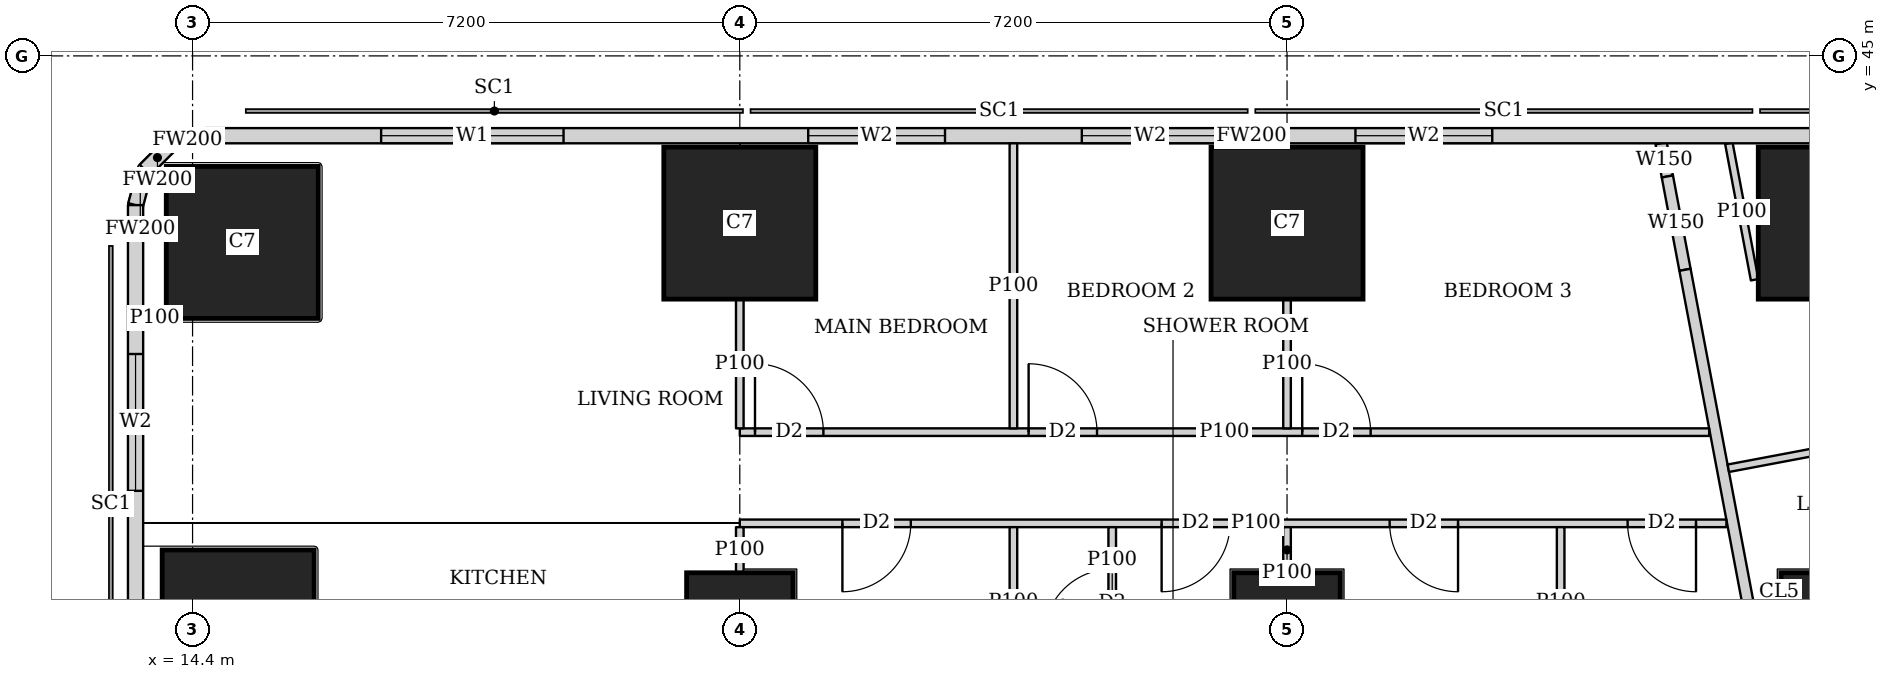
"""IFC4 building model, lengths in metres.
Left out: names, types, materials, properties, quantities, classifications, styles, units other than length and angle.
Written with IfcOpenShell. Run it as: python <this file> out.ifc"""

import sys

from ifc_helpers import new_model, si_unit, direction, frame, frame_2d, origin, origin_2d, place, context, subcontext, project, spatial, rectangle, extrude, element, fill, save


model = new_model("IFC4")
c1 = context("Model", 3, precision=1e-05, world=origin(), true_north=direction((0.0, 1.0)))
c2 = subcontext(c1, "Body", "Model", "MODEL_VIEW")
j1 = project(units=[si_unit("LENGTHUNIT", "METRE"), si_unit("PLANEANGLEUNIT", "RADIAN")], contexts=[c1])
p1 = place(None, origin())
s1 = spatial("IfcSite", under=j1, at=p1, CompositionType="ELEMENT")
p2 = place(p1, origin())
s2 = spatial("IfcBuilding", under=s1, at=p2, CompositionType="ELEMENT")
p3 = place(p2, frame((0.0, 0.0, 270.35)))
s3 = spatial("IfcBuildingStorey", under=s2, at=p3, CompositionType="ELEMENT", Elevation=270.35)
p4 = place(p3, frame((15.0, 37.5, 0.0), z_axis=(0.0, 0.0, 1.0), x_axis=(1.0, 0.0, 0.0)))
e1 = element("IfcColumn", 1, at=p4, inside=s3, PredefinedType="COLUMN", context=c2, shape_type="SweptSolid", body=[
    extrude(rectangle(XDim=2.0, YDim=2.0, at=origin_2d()), origin(), (0.0, 0.0, 1.0), 3.75),
])
for number, where, z_axis, x_axis in (
    (2, (21.6, 37.5, 0.0), (0.0, 0.0, 1.0), (1.0, 0.0, 0.0)),
    (3, (28.8, 37.5, 0.0), (0.0, 0.0, 1.0), (1.0, 0.0, 0.0)),
    (4, (36.0, 37.5, 0.0), (0.0, 0.0, 1.0), (1.0, 0.0, 0.0)),
):
    element("IfcColumn", number, at=place(p3, frame(where, z_axis=z_axis, x_axis=x_axis)), inside=s3, PredefinedType="COLUMN", context=c2, shape_type="SweptSolid", body=[
        extrude(rectangle(XDim=1.4, YDim=1.4, at=origin_2d()), origin(), (0.0, 0.0, 1.0), 3.75),
    ])
for number, where, z_axis, x_axis in (
    (5, (15.054, 42.546, 0.0), (0.0, 0.0, 1.0), (1.0, 0.0, 0.0)),
    (6, (21.6, 42.8, 0.0), (0.0, 0.0, 1.0), (1.0, 0.0, 0.0)),
    (7, (28.8, 42.8, 0.0), (0.0, 0.0, 1.0), (1.0, 0.0, 0.0)),
    (8, (36.0, 42.8, 0.0), (0.0, 0.0, 1.0), (1.0, 0.0, 0.0)),
):
    element("IfcColumn", number, at=place(p3, frame(where, z_axis=z_axis, x_axis=x_axis)), inside=s3, PredefinedType="COLUMN", context=c2, shape_type="SweptSolid", body=[
        extrude(rectangle(XDim=2.0, YDim=2.0, at=origin_2d()), origin(), (0.0, 0.0, 1.0), 3.75),
    ])
p5 = place(p3, frame((42.103, 43.95, 0.0), z_axis=(0.0, 0.0, 1.0), x_axis=(-1.0, 0.0, 0.0)))
e9 = element("IfcWall", 9, at=p5, inside=s3, PredefinedType="SOLIDWALL", context=c2, shape_type="SweptSolid", body=[
    extrude(rectangle(XDim=27.54, YDim=0.2, at=frame_2d((13.77, 0.0))), origin(), (0.0, 0.0, 1.0), 3.5),
])
p6 = place(p5, frame((10.603, 0.0, 0.9)))
e10 = element("IfcOpeningElement", 10, at=p6, cuts=e9, PredefinedType="OPENING", context=c2, shape_type="SweptSolid", body=[
    extrude(rectangle(XDim=1.8, YDim=1.5, at=frame_2d((0.9, 0.75))), frame((0.0, 0.11, 0.0), z_axis=(0.0, -1.0, 0.0), x_axis=(1.0, 0.0, 0.0)), (0.0, 0.0, 1.0), 0.22),
])
p7 = place(p5, frame((14.203, 0.0, 0.9)))
e11 = element("IfcOpeningElement", 11, at=p7, cuts=e9, PredefinedType="OPENING", context=c2, shape_type="SweptSolid", body=[
    extrude(rectangle(XDim=1.8, YDim=1.5, at=frame_2d((0.9, 0.75))), frame((0.0, 0.11, 0.0), z_axis=(0.0, -1.0, 0.0), x_axis=(1.0, 0.0, 0.0)), (0.0, 0.0, 1.0), 0.22),
])
p8 = place(p5, frame((17.803, 0.0, 0.9)))
e12 = element("IfcOpeningElement", 12, at=p8, cuts=e9, PredefinedType="OPENING", context=c2, shape_type="SweptSolid", body=[
    extrude(rectangle(XDim=1.8, YDim=1.5, at=frame_2d((0.9, 0.75))), frame((0.0, 0.11, 0.0), z_axis=(0.0, -1.0, 0.0), x_axis=(1.0, 0.0, 0.0)), (0.0, 0.0, 1.0), 0.22),
])
p9 = place(p5, frame((22.822, 0.0, 0.9)))
e13 = element("IfcOpeningElement", 13, at=p9, cuts=e9, PredefinedType="OPENING", context=c2, shape_type="SweptSolid", body=[
    extrude(rectangle(XDim=2.4, YDim=1.5, at=frame_2d((1.2, 0.75))), frame((0.0, 0.11, 0.0), z_axis=(0.0, -1.0, 0.0), x_axis=(1.0, 0.0, 0.0)), (0.0, 0.0, 1.0), 0.22),
])
p10 = place(p3, frame((14.563, 43.95, 0.0), z_axis=(0.0, 0.0, 1.0), x_axis=(-0.965655254015, -0.259826731483, 0.0)))
e14 = element("IfcWall", 14, at=p10, inside=s3, PredefinedType="SOLIDWALL", context=c2, shape_type="SweptSolid", body=[
    extrude(rectangle(XDim=0.477, YDim=0.2, at=frame_2d((0.239, 0.0))), origin(), (0.0, 0.0, 1.0), 3.5),
])
p11 = place(p3, frame((14.102, 43.826, 0.0), z_axis=(0.0, 0.0, 1.0), x_axis=(-0.707369890659, -0.706843573776, 0.0)))
e15 = element("IfcWall", 15, at=p11, inside=s3, PredefinedType="SOLIDWALL", context=c2, shape_type="SweptSolid", body=[
    extrude(rectangle(XDim=0.464, YDim=0.2, at=frame_2d((0.232, 0.0))), origin(), (0.0, 0.0, 1.0), 3.5),
])
p12 = place(p3, frame((13.774, 43.498, 0.0), z_axis=(0.0, 0.0, 1.0), x_axis=(-0.259826731483, -0.965655254015, 0.0)))
e16 = element("IfcWall", 16, at=p12, inside=s3, PredefinedType="SOLIDWALL", context=c2, shape_type="SweptSolid", body=[
    extrude(rectangle(XDim=0.477, YDim=0.2, at=frame_2d((0.239, 0.0))), origin(), (0.0, 0.0, 1.0), 3.5),
])
p13 = place(p3, frame((13.65, 43.037, 0.0), z_axis=(0.0, 0.0, 1.0), x_axis=(0.0, -1.0, 0.0)))
e17 = element("IfcWall", 17, at=p13, inside=s3, PredefinedType="SOLIDWALL", context=c2, shape_type="SweptSolid", body=[
    extrude(rectangle(XDim=35.374, YDim=0.2, at=frame_2d((17.687, 0.0))), origin(), (0.0, 0.0, 1.0), 3.5),
])
p14 = place(p13, frame((1.959, 0.0, 0.9)))
e18 = element("IfcOpeningElement", 18, at=p14, cuts=e17, PredefinedType="OPENING", context=c2, shape_type="SweptSolid", body=[
    extrude(rectangle(XDim=1.8, YDim=1.5, at=frame_2d((0.9, 0.75))), frame((0.0, 0.11, 0.0), z_axis=(0.0, -1.0, 0.0), x_axis=(1.0, 0.0, 0.0)), (0.0, 0.0, 1.0), 0.22),
])
p15 = place(p3, frame((33.722, 43.85, 0.0), z_axis=(0.0, 0.0, 1.0), x_axis=(0.184886516626, -0.982759877066, 0.0)))
e19 = element("IfcWall", 19, at=p15, inside=s3, PredefinedType="SOLIDWALL", context=c2, shape_type="SweptSolid", body=[
    extrude(rectangle(XDim=0.444, YDim=0.15, at=frame_2d((0.222, 0.0))), origin(), (0.0, 0.0, 1.0), 3.5),
])
p16 = place(p3, frame((33.804, 43.414, 0.0), z_axis=(0.0, 0.0, 1.0), x_axis=(0.185585816539, -0.982628060204, 0.0)))
e20 = element("IfcWall", 20, at=p16, inside=s3, PredefinedType="SOLIDWALL", context=c2, shape_type="SweptSolid", body=[
    extrude(rectangle(XDim=1.25, YDim=0.15, at=frame_2d((0.625, 0.0))), origin(), (0.0, 0.0, 1.0), 2.05),
])
p17 = place(p3, frame((34.036, 42.186, 0.0), z_axis=(0.0, 0.0, 1.0), x_axis=(0.185593518645, -0.9826266055, 0.0)))
e21 = element("IfcWall", 21, at=p17, inside=s3, PredefinedType="SOLIDWALL", context=c2, shape_type="SweptSolid", body=[
    extrude(rectangle(XDim=35.961, YDim=0.15, at=frame_2d((17.98, 0.0))), origin(), (0.0, 0.0, 1.0), 2.5),
])
p18 = place(p17, frame((15.529, 0.0, 0.0)))
e22 = element("IfcOpeningElement", 22, at=p18, cuts=e21, PredefinedType="OPENING", context=c2, shape_type="SweptSolid", body=[
    extrude(rectangle(XDim=1.0, YDim=2.1, at=frame_2d((0.5, 1.05))), frame((0.0, 0.085, 0.0), z_axis=(0.0, -1.0, 0.0), x_axis=(1.0, 0.0, 0.0)), (0.0, 0.0, 1.0), 0.17),
])
p19 = place(p17, frame((19.345, 0.0, 0.0)))
e23 = element("IfcOpeningElement", 23, at=p19, cuts=e21, PredefinedType="OPENING", context=c2, shape_type="SweptSolid", body=[
    extrude(rectangle(XDim=1.0, YDim=2.1, at=frame_2d((0.5, 1.05))), frame((0.0, 0.085, 0.0), z_axis=(0.0, -1.0, 0.0), x_axis=(1.0, 0.0, 0.0)), (0.0, 0.0, 1.0), 0.17),
])
p20 = place(p17, frame((30.594, 0.0, 0.0)))
e24 = element("IfcOpeningElement", 24, at=p20, cuts=e21, PredefinedType="OPENING", context=c2, shape_type="SweptSolid", body=[
    extrude(rectangle(XDim=1.0, YDim=2.1, at=frame_2d((0.5, 1.05))), frame((0.0, 0.085, 0.0), z_axis=(0.0, -1.0, 0.0), x_axis=(1.0, 0.0, 0.0)), (0.0, 0.0, 1.0), 0.17),
])
p21 = place(p3, frame((34.952, 42.055, 0.0), z_axis=(0.0, 0.0, 1.0), x_axis=(-0.185490642006, 0.98264603074, 0.0)))
e25 = element("IfcWall", 25, at=p21, inside=s3, PredefinedType="PARTITIONING", context=c2, shape_type="SweptSolid", body=[
    extrude(rectangle(XDim=1.827, YDim=0.1, at=frame_2d((0.914, 0.0))), origin(), (0.0, 0.0, 1.0), 2.05),
])
p22 = place(p3, frame((37.824, 40.182, 0.0), z_axis=(0.0, 0.0, 1.0), x_axis=(-0.982674977865, -0.185337227447, 0.0)))
e26 = element("IfcWall", 26, at=p22, inside=s3, PredefinedType="PARTITIONING", context=c2, shape_type="SweptSolid", body=[
    extrude(rectangle(XDim=3.275, YDim=0.1, at=frame_2d((1.637, 0.0))), origin(), (0.0, 0.0, 1.0), 3.5),
])
p23 = place(p3, frame((14.054, 41.546, 0.0), z_axis=(0.0, 0.0, 1.0), x_axis=(-1.0, 0.0, 0.0)))
e27 = element("IfcWall", 27, at=p23, inside=s3, PredefinedType="PARTITIONING", context=c2, shape_type="SweptSolid", body=[
    extrude(rectangle(XDim=0.304, YDim=0.1, at=frame_2d((0.152, 0.0))), origin(), (0.0, 0.0, 1.0), 3.5),
])
p24 = place(p3, frame((21.6, 40.05, 0.0), z_axis=(0.0, 0.0, 1.0), x_axis=(1.0, 0.0, 0.0)))
e28 = element("IfcWall", 28, at=p24, inside=s3, PredefinedType="PARTITIONING", context=c2, shape_type="SweptSolid", body=[
    extrude(rectangle(XDim=12.754, YDim=0.1, at=frame_2d((6.377, 0.0))), origin(), (0.0, 0.0, 1.0), 3.5),
])
p25 = place(p24, frame((0.2, 0.0, 0.0)))
e29 = element("IfcOpeningElement", 29, at=p25, cuts=e28, PredefinedType="OPENING", context=c2, shape_type="SweptSolid", body=[
    extrude(rectangle(XDim=0.9, YDim=2.1, at=frame_2d((0.45, 1.05))), frame((0.0, 0.06, 0.0), z_axis=(0.0, -1.0, 0.0), x_axis=(1.0, 0.0, 0.0)), (0.0, 0.0, 1.0), 0.12),
])
p26 = place(p24, frame((3.8, 0.0, 0.0)))
e30 = element("IfcOpeningElement", 30, at=p26, cuts=e28, PredefinedType="OPENING", context=c2, shape_type="SweptSolid", body=[
    extrude(rectangle(XDim=0.9, YDim=2.1, at=frame_2d((0.45, 1.05))), frame((0.0, 0.06, 0.0), z_axis=(0.0, -1.0, 0.0), x_axis=(1.0, 0.0, 0.0)), (0.0, 0.0, 1.0), 0.12),
])
p27 = place(p24, frame((7.4, 0.0, 0.0)))
e31 = element("IfcOpeningElement", 31, at=p27, cuts=e28, PredefinedType="OPENING", context=c2, shape_type="SweptSolid", body=[
    extrude(rectangle(XDim=0.9, YDim=2.1, at=frame_2d((0.45, 1.05))), frame((0.0, 0.06, 0.0), z_axis=(0.0, -1.0, 0.0), x_axis=(1.0, 0.0, 0.0)), (0.0, 0.0, 1.0), 0.12),
])
p28 = place(p3, frame((21.6, 38.85, 0.0), z_axis=(0.0, 0.0, 1.0), x_axis=(1.0, 0.0, 0.0)))
e32 = element("IfcWall", 32, at=p28, inside=s3, PredefinedType="PARTITIONING", context=c2, shape_type="SweptSolid", body=[
    extrude(rectangle(XDim=12.981, YDim=0.1, at=frame_2d((6.49, 0.0))), origin(), (0.0, 0.0, 1.0), 3.5),
])
p29 = place(p28, frame((1.35, 0.0, 0.0)))
e33 = element("IfcOpeningElement", 33, at=p29, cuts=e32, PredefinedType="OPENING", context=c2, shape_type="SweptSolid", body=[
    extrude(rectangle(XDim=0.9, YDim=2.1, at=frame_2d((0.45, 1.05))), frame((0.0, 0.06, 0.0), z_axis=(0.0, -1.0, 0.0), x_axis=(1.0, 0.0, 0.0)), (0.0, 0.0, 1.0), 0.12),
])
p30 = place(p28, frame((5.55, 0.0, 0.0)))
e34 = element("IfcOpeningElement", 34, at=p30, cuts=e32, PredefinedType="OPENING", context=c2, shape_type="SweptSolid", body=[
    extrude(rectangle(XDim=0.9, YDim=2.1, at=frame_2d((0.45, 1.05))), frame((0.0, 0.06, 0.0), z_axis=(0.0, -1.0, 0.0), x_axis=(1.0, 0.0, 0.0)), (0.0, 0.0, 1.0), 0.12),
])
p31 = place(p28, frame((8.55, 0.0, 0.0)))
e35 = element("IfcOpeningElement", 35, at=p31, cuts=e32, PredefinedType="OPENING", context=c2, shape_type="SweptSolid", body=[
    extrude(rectangle(XDim=0.9, YDim=2.1, at=frame_2d((0.45, 1.05))), frame((0.0, 0.06, 0.0), z_axis=(0.0, -1.0, 0.0), x_axis=(1.0, 0.0, 0.0)), (0.0, 0.0, 1.0), 0.12),
])
p32 = place(p28, frame((11.681, 0.0, 0.0)))
e36 = element("IfcOpeningElement", 36, at=p32, cuts=e32, PredefinedType="OPENING", context=c2, shape_type="SweptSolid", body=[
    extrude(rectangle(XDim=0.9, YDim=2.1, at=frame_2d((0.45, 1.05))), frame((0.0, 0.06, 0.0), z_axis=(0.0, -1.0, 0.0), x_axis=(1.0, 0.0, 0.0)), (0.0, 0.0, 1.0), 0.12),
])
p33 = place(p3, frame((21.6, 40.1, 0.0), z_axis=(0.0, 0.0, 1.0), x_axis=(0.0, 1.0, 0.0)))
e37 = element("IfcWall", 37, at=p33, inside=s3, PredefinedType="PARTITIONING", context=c2, shape_type="SweptSolid", body=[
    extrude(rectangle(XDim=1.699, YDim=0.1, at=frame_2d((0.85, 0.0))), origin(), (0.0, 0.0, 1.0), 3.5),
])
p34 = place(p3, frame((25.2, 40.1, 0.0), z_axis=(0.0, 0.0, 1.0), x_axis=(0.0, 1.0, 0.0)))
e38 = element("IfcWall", 38, at=p34, inside=s3, PredefinedType="PARTITIONING", context=c2, shape_type="SweptSolid", body=[
    extrude(rectangle(XDim=3.75, YDim=0.1, at=frame_2d((1.875, 0.0))), origin(), (0.0, 0.0, 1.0), 2.05),
])
p35 = place(p3, frame((28.8, 40.1, 0.0), z_axis=(0.0, 0.0, 1.0), x_axis=(0.0, 1.0, 0.0)))
e39 = element("IfcWall", 39, at=p35, inside=s3, PredefinedType="PARTITIONING", context=c2, shape_type="SweptSolid", body=[
    extrude(rectangle(XDim=1.699, YDim=0.1, at=frame_2d((0.85, 0.0))), origin(), (0.0, 0.0, 1.0), 3.5),
])
p36 = place(p3, frame((21.6, 38.201, 0.0), z_axis=(0.0, 0.0, 1.0), x_axis=(0.0, 1.0, 0.0)))
e40 = element("IfcWall", 40, at=p36, inside=s3, PredefinedType="PARTITIONING", context=c2, shape_type="SweptSolid", body=[
    extrude(rectangle(XDim=0.599, YDim=0.1, at=frame_2d((0.3, 0.0))), origin(), (0.0, 0.0, 1.0), 3.5),
])
p37 = place(p3, frame((25.2, 36.825, 0.0), z_axis=(0.0, 0.0, 1.0), x_axis=(0.0, 1.0, 0.0)))
e41 = element("IfcWall", 41, at=p37, inside=s3, PredefinedType="PARTITIONING", context=c2, shape_type="SweptSolid", body=[
    extrude(rectangle(XDim=1.975, YDim=0.1, at=frame_2d((0.988, 0.0))), origin(), (0.0, 0.0, 1.0), 3.5),
])
p38 = place(p3, frame((28.8, 38.201, 0.0), z_axis=(0.0, 0.0, 1.0), x_axis=(0.0, 1.0, 0.0)))
e42 = element("IfcWall", 42, at=p38, inside=s3, PredefinedType="PARTITIONING", context=c2, shape_type="SweptSolid", body=[
    extrude(rectangle(XDim=0.599, YDim=0.1, at=frame_2d((0.3, 0.0))), origin(), (0.0, 0.0, 1.0), 3.5),
])
p39 = place(p3, frame((32.4, 36.825, 0.0), z_axis=(0.0, 0.0, 1.0), x_axis=(0.0, 1.0, 0.0)))
e43 = element("IfcWall", 43, at=p39, inside=s3, PredefinedType="PARTITIONING", context=c2, shape_type="SweptSolid", body=[
    extrude(rectangle(XDim=1.975, YDim=0.1, at=frame_2d((0.988, 0.0))), origin(), (0.0, 0.0, 1.0), 3.5),
])
p40 = place(p3, frame((26.5, 36.825, 0.0), z_axis=(0.0, 0.0, 1.0), x_axis=(0.0, 1.0, 0.0)))
e44 = element("IfcWall", 44, at=p40, inside=s3, PredefinedType="PARTITIONING", context=c2, shape_type="SweptSolid", body=[
    extrude(rectangle(XDim=1.975, YDim=0.1, at=frame_2d((0.988, 0.0))), origin(), (0.0, 0.0, 1.0), 3.5),
])
p41 = place(p40, frame((0.525, 0.0, 0.0)))
e45 = element("IfcOpeningElement", 45, at=p41, cuts=e44, PredefinedType="OPENING", context=c2, shape_type="SweptSolid", body=[
    extrude(rectangle(XDim=0.9, YDim=2.1, at=frame_2d((0.45, 1.05))), frame((0.0, 0.06, 0.0), z_axis=(0.0, -1.0, 0.0), x_axis=(1.0, 0.0, 0.0)), (0.0, 0.0, 1.0), 0.12),
])
p42 = place(p6, origin())
e46 = element("IfcWindow", 46, at=p42, inside=s3, PartitioningType="SINGLE_PANEL", PredefinedType="WINDOW", context=c2, shape_type="SweptSolid", body=[
    extrude(rectangle(XDim=1.8, YDim=1.5, at=frame_2d((0.9, 0.75))), frame((0.0, 0.03, 0.0), z_axis=(0.0, -1.0, 0.0), x_axis=(1.0, 0.0, 0.0)), (0.0, 0.0, 1.0), 0.06),
])
fill(e10, e46)
p43 = place(p7, origin())
e47 = element("IfcWindow", 47, at=p43, inside=s3, PartitioningType="SINGLE_PANEL", PredefinedType="WINDOW", context=c2, shape_type="SweptSolid", body=[
    extrude(rectangle(XDim=1.8, YDim=1.5, at=frame_2d((0.9, 0.75))), frame((0.0, 0.03, 0.0), z_axis=(0.0, -1.0, 0.0), x_axis=(1.0, 0.0, 0.0)), (0.0, 0.0, 1.0), 0.06),
])
fill(e11, e47)
p44 = place(p8, origin())
e48 = element("IfcWindow", 48, at=p44, inside=s3, PartitioningType="SINGLE_PANEL", PredefinedType="WINDOW", context=c2, shape_type="SweptSolid", body=[
    extrude(rectangle(XDim=1.8, YDim=1.5, at=frame_2d((0.9, 0.75))), frame((0.0, 0.03, 0.0), z_axis=(0.0, -1.0, 0.0), x_axis=(1.0, 0.0, 0.0)), (0.0, 0.0, 1.0), 0.06),
])
fill(e12, e48)
p45 = place(p9, origin())
e49 = element("IfcWindow", 49, at=p45, inside=s3, PartitioningType="SINGLE_PANEL", PredefinedType="WINDOW", context=c2, shape_type="SweptSolid", body=[
    extrude(rectangle(XDim=2.4, YDim=1.5, at=frame_2d((1.2, 0.75))), frame((0.0, 0.03, 0.0), z_axis=(0.0, -1.0, 0.0), x_axis=(1.0, 0.0, 0.0)), (0.0, 0.0, 1.0), 0.06),
])
fill(e13, e49)
p46 = place(p14, origin())
e50 = element("IfcWindow", 50, at=p46, inside=s3, PartitioningType="SINGLE_PANEL", PredefinedType="WINDOW", context=c2, shape_type="SweptSolid", body=[
    extrude(rectangle(XDim=1.8, YDim=1.5, at=frame_2d((0.9, 0.75))), frame((0.0, 0.03, 0.0), z_axis=(0.0, -1.0, 0.0), x_axis=(1.0, 0.0, 0.0)), (0.0, 0.0, 1.0), 0.06),
])
fill(e18, e50)
p47 = place(p25, origin())
e51 = element("IfcDoor", 51, at=p47, inside=s3, OperationType="SINGLE_SWING_LEFT", PredefinedType="DOOR", context=c2, shape_type="SweptSolid", body=[
    extrude(rectangle(XDim=0.9, YDim=2.1, at=frame_2d((0.45, 1.05))), frame((0.0, 0.025, 0.0), z_axis=(0.0, -1.0, 0.0), x_axis=(1.0, 0.0, 0.0)), (0.0, 0.0, 1.0), 0.05),
])
fill(e29, e51)
p48 = place(p26, origin())
e52 = element("IfcDoor", 52, at=p48, inside=s3, OperationType="SINGLE_SWING_LEFT", PredefinedType="DOOR", context=c2, shape_type="SweptSolid", body=[
    extrude(rectangle(XDim=0.9, YDim=2.1, at=frame_2d((0.45, 1.05))), frame((0.0, 0.025, 0.0), z_axis=(0.0, -1.0, 0.0), x_axis=(1.0, 0.0, 0.0)), (0.0, 0.0, 1.0), 0.05),
])
fill(e30, e52)
p49 = place(p27, origin())
e53 = element("IfcDoor", 53, at=p49, inside=s3, OperationType="SINGLE_SWING_LEFT", PredefinedType="DOOR", context=c2, shape_type="SweptSolid", body=[
    extrude(rectangle(XDim=0.9, YDim=2.1, at=frame_2d((0.45, 1.05))), frame((0.0, 0.025, 0.0), z_axis=(0.0, -1.0, 0.0), x_axis=(1.0, 0.0, 0.0)), (0.0, 0.0, 1.0), 0.05),
])
fill(e31, e53)
p50 = place(p29, origin())
e54 = element("IfcDoor", 54, at=p50, inside=s3, OperationType="SINGLE_SWING_RIGHT", PredefinedType="DOOR", context=c2, shape_type="SweptSolid", body=[
    extrude(rectangle(XDim=0.9, YDim=2.1, at=frame_2d((0.45, 1.05))), frame((0.0, 0.025, 0.0), z_axis=(0.0, -1.0, 0.0), x_axis=(1.0, 0.0, 0.0)), (0.0, 0.0, 1.0), 0.05),
])
fill(e33, e54)
p51 = place(p30, origin())
e55 = element("IfcDoor", 55, at=p51, inside=s3, OperationType="SINGLE_SWING_RIGHT", PredefinedType="DOOR", context=c2, shape_type="SweptSolid", body=[
    extrude(rectangle(XDim=0.9, YDim=2.1, at=frame_2d((0.45, 1.05))), frame((0.0, 0.025, 0.0), z_axis=(0.0, -1.0, 0.0), x_axis=(1.0, 0.0, 0.0)), (0.0, 0.0, 1.0), 0.05),
])
fill(e34, e55)
p52 = place(p31, origin())
e56 = element("IfcDoor", 56, at=p52, inside=s3, OperationType="SINGLE_SWING_LEFT", PredefinedType="DOOR", context=c2, shape_type="SweptSolid", body=[
    extrude(rectangle(XDim=0.9, YDim=2.1, at=frame_2d((0.45, 1.05))), frame((0.0, 0.025, 0.0), z_axis=(0.0, -1.0, 0.0), x_axis=(1.0, 0.0, 0.0)), (0.0, 0.0, 1.0), 0.05),
])
fill(e35, e56)
p53 = place(p32, origin())
e57 = element("IfcDoor", 57, at=p53, inside=s3, OperationType="SINGLE_SWING_LEFT", PredefinedType="DOOR", context=c2, shape_type="SweptSolid", body=[
    extrude(rectangle(XDim=0.9, YDim=2.1, at=frame_2d((0.45, 1.05))), frame((0.0, 0.025, 0.0), z_axis=(0.0, -1.0, 0.0), x_axis=(1.0, 0.0, 0.0)), (0.0, 0.0, 1.0), 0.05),
])
fill(e36, e57)
p54 = place(p41, origin())
e58 = element("IfcDoor", 58, at=p54, inside=s3, OperationType="SINGLE_SWING_LEFT", PredefinedType="DOOR", context=c2, shape_type="SweptSolid", body=[
    extrude(rectangle(XDim=0.9, YDim=2.1, at=frame_2d((0.45, 1.05))), frame((0.0, 0.025, 0.0), z_axis=(0.0, -1.0, 0.0), x_axis=(1.0, 0.0, 0.0)), (0.0, 0.0, 1.0), 0.05),
])
fill(e45, e58)
save(model, sys.argv[1])
